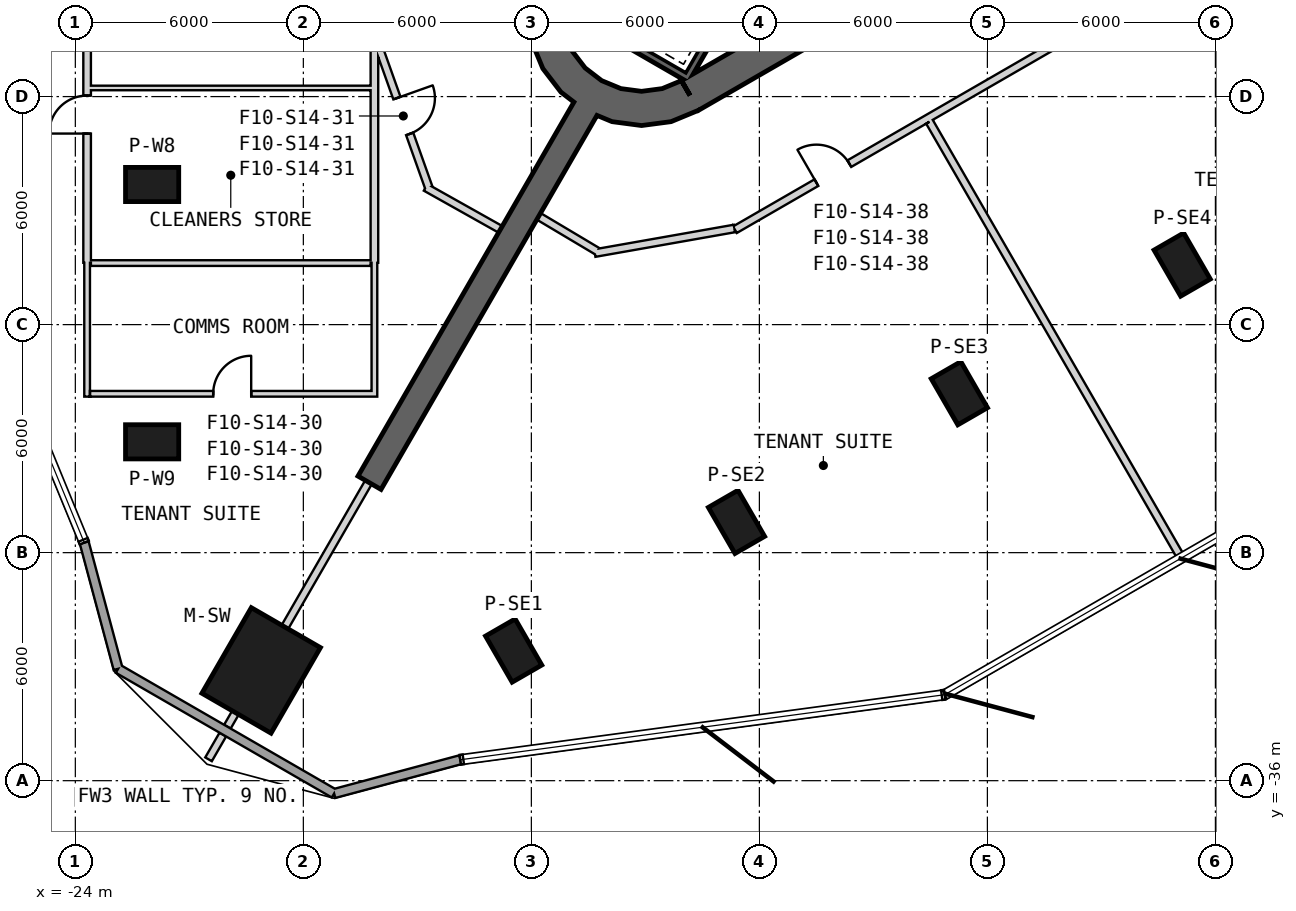
"""IFC4 building model, lengths in metres.
Left out: names, types, materials, properties, quantities, classifications, styles, units other than length and angle.
Written with IfcOpenShell. Run it as: python <this file> out.ifc"""

import sys

from ifc_helpers import new_model, si_unit, direction, frame, frame_2d, origin, origin_2d, place, context, subcontext, project, spatial, polyline, rectangle, outline, extrude, element, fill, save


model = new_model("IFC4")
c1 = context("Model", 3, precision=1e-05, world=origin(), true_north=direction((0.0, 1.0)))
c2 = subcontext(c1, "Body", "Model", "MODEL_VIEW")
j1 = project(units=[si_unit("LENGTHUNIT", "METRE"), si_unit("PLANEANGLEUNIT", "RADIAN")], contexts=[c1])
p1 = place(None, origin())
s1 = spatial("IfcSite", under=j1, at=p1, CompositionType="ELEMENT")
p2 = place(p1, origin())
s2 = spatial("IfcBuilding", under=s1, at=p2, CompositionType="ELEMENT")
p3 = place(p2, frame((0.0, 0.0, 229.2)))
s3 = spatial("IfcBuildingStorey", under=s2, at=p3, CompositionType="ELEMENT", Elevation=229.2)
p4 = place(p3, frame((-19.11, -33.099, 0.0), z_axis=(0.0, 0.0, 1.0), x_axis=(-0.5, -0.866025403784, 0.0)))
e1 = element("IfcColumn", 1, at=p4, inside=s3, PredefinedType="COLUMN", context=c2, shape_type="SweptSolid", body=[
    extrude(rectangle(XDim=2.6, YDim=2.1, at=origin_2d()), origin(), (0.0, 0.0, 1.0), 4.0),
])
for number, where, z_axis, x_axis in (
    (2, (-21.979, -20.313, 0.0), (0.0, 0.0, 1.0), (-1.0, 0.0, 0.0)),
    (3, (-21.979, -27.084, 0.0), (0.0, 0.0, 1.0), (-1.0, 0.0, 0.0)),
    (4, (-12.466, -32.576, 0.0), (0.0, 0.0, 1.0), (0.5, -0.866, 0.0)),
    (5, (-6.602, -29.191, 0.0), (0.0, 0.0, 1.0), (0.5, -0.866, 0.0)),
    (6, (-0.738, -25.805, 0.0), (0.0, 0.0, 1.0), (0.5, -0.866, 0.0)),
    (7, (5.126, -22.42, 0.0), (0.0, 0.0, 1.0), (0.5, -0.866, 0.0)),
):
    element("IfcColumn", number, at=place(p3, frame(where, z_axis=z_axis, x_axis=x_axis)), inside=s3, PredefinedType="COLUMN", context=c2, shape_type="SweptSolid", body=[
        extrude(rectangle(XDim=1.4, YDim=0.9, at=origin_2d()), origin(), (0.0, 0.0, 1.0), 4.0),
    ])
p5 = place(p3, frame((-7.825, -17.97, 0.0), z_axis=(0.0, 0.0, 1.0), x_axis=(0.866028369851, 0.499994862586, 0.0)))
e8 = element("IfcWall", 8, at=p5, inside=s3, PredefinedType="SHEAR", context=c2, shape_type="SweptSolid", body=[
    extrude(rectangle(XDim=31.523, YDim=0.9, at=frame_2d((15.762, 0.0))), origin(), (0.0, 0.0, 1.0), 4.0),
])
p6 = place(p5, frame((7.062, 0.0, 0.0)))
e9 = element("IfcOpeningElement", 9, at=p6, cuts=e8, PredefinedType="OPENING", context=c2, shape_type="SweptSolid", body=[
    extrude(rectangle(XDim=1.2, YDim=2.4, at=frame_2d((0.6, 1.2))), frame((0.0, 0.46, 0.0), z_axis=(0.0, -1.0, 0.0), x_axis=(1.0, 0.0, 0.0)), (0.0, 0.0, 1.0), 0.92),
])
p7 = place(p5, frame((9.762, 0.0, 0.0)))
e10 = element("IfcOpeningElement", 10, at=p7, cuts=e8, PredefinedType="OPENING", context=c2, shape_type="SweptSolid", body=[
    extrude(rectangle(XDim=1.2, YDim=2.4, at=frame_2d((0.6, 1.2))), frame((0.0, 0.46, 0.0), z_axis=(0.0, -1.0, 0.0), x_axis=(1.0, 0.0, 0.0)), (0.0, 0.0, 1.0), 0.92),
])
p8 = place(p5, frame((12.462, 0.0, 0.0)))
e11 = element("IfcOpeningElement", 11, at=p8, cuts=e8, PredefinedType="OPENING", context=c2, shape_type="SweptSolid", body=[
    extrude(rectangle(XDim=1.2, YDim=2.4, at=frame_2d((0.6, 1.2))), frame((0.0, 0.46, 0.0), z_axis=(0.0, -1.0, 0.0), x_axis=(1.0, 0.0, 0.0)), (0.0, 0.0, 1.0), 0.92),
])
p9 = place(p5, frame((15.162, 0.0, 0.0)))
e12 = element("IfcOpeningElement", 12, at=p9, cuts=e8, PredefinedType="OPENING", context=c2, shape_type="SweptSolid", body=[
    extrude(rectangle(XDim=1.2, YDim=2.4, at=frame_2d((0.6, 1.2))), frame((0.0, 0.46, 0.0), z_axis=(0.0, -1.0, 0.0), x_axis=(1.0, 0.0, 0.0)), (0.0, 0.0, 1.0), 0.92),
])
p10 = place(p5, frame((17.862, 0.0, 0.0)))
e13 = element("IfcOpeningElement", 13, at=p10, cuts=e8, PredefinedType="OPENING", context=c2, shape_type="SweptSolid", body=[
    extrude(rectangle(XDim=1.2, YDim=2.4, at=frame_2d((0.6, 1.2))), frame((0.0, 0.46, 0.0), z_axis=(0.0, -1.0, 0.0), x_axis=(1.0, 0.0, 0.0)), (0.0, 0.0, 1.0), 0.92),
])
p11 = place(p5, frame((20.562, 0.0, 0.0)))
e14 = element("IfcOpeningElement", 14, at=p11, cuts=e8, PredefinedType="OPENING", context=c2, shape_type="SweptSolid", body=[
    extrude(rectangle(XDim=1.2, YDim=2.4, at=frame_2d((0.6, 1.2))), frame((0.0, 0.46, 0.0), z_axis=(0.0, -1.0, 0.0), x_axis=(1.0, 0.0, 0.0)), (0.0, 0.0, 1.0), 0.92),
])
p12 = place(p5, frame((26.712, 0.0, 0.0)))
e15 = element("IfcOpeningElement", 15, at=p12, cuts=e8, PredefinedType="OPENING", context=c2, shape_type="SweptSolid", body=[
    extrude(rectangle(XDim=1.2, YDim=2.4, at=frame_2d((0.6, 1.2))), frame((0.0, 0.46, 0.0), z_axis=(0.0, -1.0, 0.0), x_axis=(1.0, 0.0, 0.0)), (0.0, 0.0, 1.0), 0.92),
])
p13 = place(p5, frame((3.612, 0.0, 0.0)))
e16 = element("IfcOpeningElement", 16, at=p13, cuts=e8, PredefinedType="OPENING", context=c2, shape_type="SweptSolid", body=[
    extrude(rectangle(XDim=1.2, YDim=2.4, at=frame_2d((0.6, 1.2))), frame((0.0, 0.46, 0.0), z_axis=(0.0, -1.0, 0.0), x_axis=(1.0, 0.0, 0.0)), (0.0, 0.0, 1.0), 0.92),
])
p14 = place(p3, origin())
e17 = element("IfcWall", 17, at=p14, inside=s3, PredefinedType="SHEAR", context=c2, shape_type="SweptSolid", body=[
    extrude(outline(polyline([(-12.1, -15.762), (-11.998, -16.538), (-11.698, -17.262), (-11.221, -17.883), (-10.6, -18.36), (-9.876, -18.659), (-9.1, -18.762), (-8.323, -18.659), (-7.6, -18.36), (-8.05, -17.58), (-8.556, -17.79), (-9.1, -17.862), (-9.644, -17.79), (-10.15, -17.58), (-10.585, -17.247), (-10.919, -16.812), (-11.128, -16.305), (-11.2, -15.762), (-12.1, -15.762)])), origin(), (0.0, 0.0, 1.0), 4.0),
])
p15 = place(p3, frame((-10.575, -18.316, 0.0), z_axis=(0.0, 0.0, 1.0), x_axis=(-0.499996344484, -0.866027514288, 0.0)))
e18 = element("IfcWall", 18, at=p15, inside=s3, PredefinedType="SHEAR", context=c2, shape_type="SweptSolid", body=[
    extrude(rectangle(XDim=11.368, YDim=0.7, at=frame_2d((5.684, 0.0))), origin(), (0.0, 0.0, 1.0), 4.0),
])
p16 = place(p3, frame((-23.765, -29.736, 0.0), z_axis=(0.0, 0.0, 1.0), x_axis=(0.258842571536, -0.965919522093, 0.0)))
e19 = element("IfcWall", 19, at=p16, inside=s3, PredefinedType="SOLIDWALL", context=c2, shape_type="SweptSolid", body=[
    extrude(rectangle(XDim=3.438, YDim=0.24, at=frame_2d((1.719, 0.0))), origin(), (0.0, 0.0, 1.0), 3.7),
])
p17 = place(p3, frame((-22.875, -33.057, 0.0), z_axis=(0.0, 0.0, 1.0), x_axis=(0.866012172048, -0.50002291734, 0.0)))
e20 = element("IfcWall", 20, at=p17, inside=s3, PredefinedType="SOLIDWALL", context=c2, shape_type="SweptSolid", body=[
    extrude(rectangle(XDim=6.565, YDim=0.24, at=frame_2d((3.282, 0.0))), origin(), (0.0, 0.0, 1.0), 3.7),
])
p18 = place(p3, frame((-17.19, -36.339, 0.0), z_axis=(0.0, 0.0, 1.0), x_axis=(0.965919522093, 0.258842571536, 0.0)))
e21 = element("IfcWall", 21, at=p18, inside=s3, PredefinedType="SOLIDWALL", context=c2, shape_type="SweptSolid", body=[
    extrude(rectangle(XDim=3.438, YDim=0.24, at=frame_2d((1.719, 0.0))), origin(), (0.0, 0.0, 1.0), 3.7),
])
p19 = place(p3, frame((-3.905, -10.563, -0.3), z_axis=(0.0, 0.0, 1.0), x_axis=(-0.500012932018, -0.866017937352, 0.0)))
e22 = element("IfcWall", 22, at=p19, inside=s3, PredefinedType="SHEAR", context=c2, shape_type="SweptSolid", body=[
    extrude(rectangle(XDim=8.1, YDim=0.2, at=frame_2d((4.05, 0.0))), origin(), (0.0, 0.0, 1.0), 4.0),
])
p20 = place(p3, frame((-11.282, -15.541, -0.3), z_axis=(0.0, 0.0, 1.0), x_axis=(0.866000483506, -0.500043160704, 0.0)))
e23 = element("IfcWall", 23, at=p20, inside=s3, PredefinedType="SHEAR", context=c2, shape_type="SweptSolid", body=[
    extrude(rectangle(XDim=3.8, YDim=0.2, at=frame_2d((1.9, 0.0))), origin(), (0.0, 0.0, 1.0), 4.0),
])
p21 = place(p3, frame((-14.781, -20.389, 0.0), z_axis=(0.0, 0.0, 1.0), x_axis=(0.871979734391, -0.489541972471, 0.0)))
e24 = element("IfcWall", 24, at=p21, inside=s3, PredefinedType="PARTITIONING", context=c2, shape_type="SweptSolid", body=[
    extrude(rectangle(XDim=2.257, YDim=0.2, at=frame_2d((1.128, 0.0))), origin(), (0.0, 0.0, 1.0), 3.7),
])
p22 = place(p3, frame((-16.042, -16.623, 0.0), z_axis=(0.0, 0.0, 1.0), x_axis=(0.335572111171, -0.942014521228, 0.0)))
e25 = element("IfcWall", 25, at=p22, inside=s3, PredefinedType="PARTITIONING", context=c2, shape_type="SweptSolid", body=[
    extrude(rectangle(XDim=4.007, YDim=0.2, at=frame_2d((2.004, 0.0))), origin(), (0.0, 0.0, 1.0), 2.78),
])
p23 = place(p22, frame((1.504, 0.0, 0.0)))
e26 = element("IfcOpeningElement", 26, at=p23, cuts=e25, PredefinedType="OPENING", context=c2, shape_type="SweptSolid", body=[
    extrude(rectangle(XDim=1.0, YDim=2.1, at=frame_2d((0.5, 1.05))), frame((0.0, 0.11, 0.0), z_axis=(0.0, -1.0, 0.0), x_axis=(1.0, 0.0, 0.0)), (0.0, 0.0, 1.0), 0.22),
])
p24 = place(p3, frame((-6.644, -21.503, 0.0), z_axis=(0.0, 0.0, 1.0), x_axis=(0.866020815794, 0.500007946548, 0.0)))
e27 = element("IfcWall", 27, at=p24, inside=s3, PredefinedType="PARTITIONING", context=c2, shape_type="SweptSolid", body=[
    extrude(rectangle(XDim=18.555, YDim=0.2, at=frame_2d((9.278, 0.0))), origin(), (0.0, 0.0, 1.0), 2.88),
])
p25 = place(p24, frame((2.477, 0.0, 0.0)))
e28 = element("IfcOpeningElement", 28, at=p25, cuts=e27, PredefinedType="OPENING", context=c2, shape_type="SweptSolid", body=[
    extrude(rectangle(XDim=1.0, YDim=2.1, at=frame_2d((0.5, 1.05))), frame((0.0, 0.11, 0.0), z_axis=(0.0, -1.0, 0.0), x_axis=(1.0, 0.0, 0.0)), (0.0, 0.0, 1.0), 0.22),
])
p26 = place(p3, frame((-10.332, -22.118, 0.0), z_axis=(0.0, 0.0, 1.0), x_axis=(0.984805281118, 0.173662195893, 0.0)))
e29 = element("IfcWall", 29, at=p26, inside=s3, PredefinedType="PARTITIONING", context=c2, shape_type="SweptSolid", body=[
    extrude(rectangle(XDim=3.732, YDim=0.2, at=frame_2d((1.866, 0.0))), origin(), (0.0, 0.0, 1.0), 2.78),
])
p27 = place(p3, frame((-11.807, -21.151, 0.0), z_axis=(0.0, 0.0, 1.0), x_axis=(0.859102811579, -0.511803047214, 0.0)))
e30 = element("IfcWall", 30, at=p27, inside=s3, PredefinedType="PARTITIONING", context=c2, shape_type="SweptSolid", body=[
    extrude(rectangle(XDim=1.802, YDim=0.2, at=frame_2d((0.901, 0.0))), origin(), (0.0, 0.0, 1.0), 3.7),
])
p28 = place(p3, frame((-16.285, -28.146, 0.0), z_axis=(0.0, 0.0, 1.0), x_axis=(-0.499992938033, -0.866029480975, 0.0)))
e31 = element("IfcWall", 31, at=p28, inside=s3, PredefinedType="PARTITIONING", context=c2, shape_type="SweptSolid", body=[
    extrude(rectangle(XDim=4.401, YDim=0.2, at=frame_2d((2.201, 0.0))), origin(), (0.0, 0.0, 1.0), 3.27),
])
p29 = place(p3, frame((-19.786, -34.21, 0.0), z_axis=(0.0, 0.0, 1.0), x_axis=(-0.50001992892, -0.866013897511, 0.0)))
e32 = element("IfcWall", 32, at=p29, inside=s3, PredefinedType="PARTITIONING", context=c2, shape_type="SweptSolid", body=[
    extrude(rectangle(XDim=0.426, YDim=0.2, at=frame_2d((0.213, 0.0))), origin(), (0.0, 0.0, 1.0), 3.7),
])
p30 = place(p3, frame((-20.119, -34.787, 0.0), z_axis=(0.0, 0.0, 1.0), x_axis=(-0.500088105676, -0.865974529972, 0.0)))
e33 = element("IfcWall", 33, at=p30, inside=s3, PredefinedType="PARTITIONING", context=c2, shape_type="SweptSolid", body=[
    extrude(rectangle(XDim=0.751, YDim=0.2, at=frame_2d((0.375, 0.0))), origin(), (0.0, 0.0, 1.0), 3.7),
])
p31 = place(p3, frame((-23.69, -22.373, 0.0), z_axis=(0.0, 0.0, 1.0), x_axis=(0.0, 1.0, 0.0)))
e34 = element("IfcWall", 34, at=p31, inside=s3, PredefinedType="PARTITIONING", context=c2, shape_type="SweptSolid", body=[
    extrude(rectangle(XDim=4.6, YDim=0.2, at=frame_2d((2.3, 0.0))), origin(), (0.0, 0.0, 1.0), 3.7),
])
p32 = place(p31, frame((3.4, 0.0, 0.0)))
e35 = element("IfcOpeningElement", 35, at=p32, cuts=e34, PredefinedType="OPENING", context=c2, shape_type="SweptSolid", body=[
    extrude(rectangle(XDim=1.0, YDim=2.1, at=frame_2d((0.5, 1.05))), frame((0.0, 0.11, 0.0), z_axis=(0.0, -1.0, 0.0), x_axis=(1.0, 0.0, 0.0)), (0.0, 0.0, 1.0), 0.22),
])
p33 = place(p3, frame((-23.69, -17.773, 0.0), z_axis=(0.0, 0.0, 1.0), x_axis=(0.0, 1.0, 0.0)))
e36 = element("IfcWall", 36, at=p33, inside=s3, PredefinedType="PARTITIONING", context=c2, shape_type="SweptSolid", body=[
    extrude(rectangle(XDim=3.422, YDim=0.2, at=frame_2d((1.711, 0.0))), origin(), (0.0, 0.0, 1.0), 3.7),
])
p34 = place(p3, frame((-16.13, -22.373, 0.0), z_axis=(0.0, 0.0, 1.0), x_axis=(0.0, 1.0, 0.0)))
e37 = element("IfcWall", 37, at=p34, inside=s3, PredefinedType="PARTITIONING", context=c2, shape_type="SweptSolid", body=[
    extrude(rectangle(XDim=4.6, YDim=0.2, at=frame_2d((2.3, 0.0))), origin(), (0.0, 0.0, 1.0), 2.78),
])
p35 = place(p3, frame((-16.13, -17.773, 0.0), z_axis=(0.0, 0.0, 1.0), x_axis=(0.0, 1.0, 0.0)))
e38 = element("IfcWall", 38, at=p35, inside=s3, PredefinedType="PARTITIONING", context=c2, shape_type="SweptSolid", body=[
    extrude(rectangle(XDim=1.26, YDim=0.2, at=frame_2d((0.63, 0.0))), origin(), (0.0, 0.0, 1.0), 3.7),
])
p36 = place(p3, frame((-23.69, -25.895, 0.0), z_axis=(0.0, 0.0, 1.0), x_axis=(0.0, 1.0, 0.0)))
e39 = element("IfcWall", 39, at=p36, inside=s3, PredefinedType="PLUMBINGWALL", context=c2, shape_type="SweptSolid", body=[
    extrude(rectangle(XDim=3.522, YDim=0.15, at=frame_2d((1.761, 0.0))), origin(), (0.0, 0.0, 1.0), 3.7),
])
p37 = place(p3, frame((-23.615, -25.82, 0.0), z_axis=(0.0, 0.0, 1.0), x_axis=(1.0, 0.0, 0.0)))
e40 = element("IfcWall", 40, at=p37, inside=s3, PredefinedType="PLUMBINGWALL", context=c2, shape_type="SweptSolid", body=[
    extrude(rectangle(XDim=7.56, YDim=0.15, at=frame_2d((3.78, 0.0))), origin(), (0.0, 0.0, 1.0), 2.78),
])
p38 = place(p37, frame((3.242, 0.0, 0.0)))
e41 = element("IfcOpeningElement", 41, at=p38, cuts=e40, PredefinedType="OPENING", context=c2, shape_type="SweptSolid", body=[
    extrude(rectangle(XDim=1.0, YDim=2.1, at=frame_2d((0.5, 1.05))), frame((0.0, 0.085, 0.0), z_axis=(0.0, -1.0, 0.0), x_axis=(1.0, 0.0, 0.0)), (0.0, 0.0, 1.0), 0.17),
])
p39 = place(p3, frame((-16.13, -25.745, 0.0), z_axis=(0.0, 0.0, 1.0), x_axis=(0.0, 1.0, 0.0)))
e42 = element("IfcWall", 42, at=p39, inside=s3, PredefinedType="PLUMBINGWALL", context=c2, shape_type="SweptSolid", body=[
    extrude(rectangle(XDim=3.372, YDim=0.15, at=frame_2d((1.686, 0.0))), origin(), (0.0, 0.0, 1.0), 3.7),
])
p40 = place(p3, frame((5.104, -30.142, 0.0), z_axis=(0.0, 0.0, 1.0), x_axis=(-0.500068930226, 0.865985603242, 0.0)))
e43 = element("IfcWall", 43, at=p40, inside=s3, PredefinedType="PARTITIONING", context=c2, shape_type="SweptSolid", body=[
    extrude(rectangle(XDim=13.256, YDim=0.2, at=frame_2d((6.628, 0.0))), origin(), (0.0, 0.0, 1.0), 2.98),
])
p41 = place(p3, frame((-16.23, -17.773, 0.0), z_axis=(0.0, 0.0, 1.0), x_axis=(-1.0, 0.0, 0.0)))
e44 = element("IfcWall", 44, at=p41, inside=s3, PredefinedType="PARTITIONING", context=c2, shape_type="SweptSolid", body=[
    extrude(rectangle(XDim=7.36, YDim=0.12, at=frame_2d((3.68, 0.0))), origin(), (0.0, 0.0, 1.0), 2.88),
])
p42 = place(p3, frame((-23.59, -22.38, 0.0), z_axis=(0.0, 0.0, 1.0), x_axis=(1.0, 0.0, 0.0)))
e45 = element("IfcWall", 45, at=p42, inside=s3, PredefinedType="PLUMBINGWALL", context=c2, shape_type="SweptSolid", body=[
    extrude(rectangle(XDim=7.36, YDim=0.15, at=frame_2d((3.68, 0.0))), origin(), (0.0, 0.0, 1.0), 2.78),
])
p43 = place(p32, origin())
e46 = element("IfcDoor", 46, at=p43, inside=s3, OperationType="SINGLE_SWING_RIGHT", PredefinedType="USERDEFINED", context=c2, shape_type="SweptSolid", body=[
    extrude(rectangle(XDim=1.0, YDim=2.1, at=frame_2d((0.5, 1.05))), frame((0.0, 0.025, 0.0), z_axis=(0.0, -1.0, 0.0), x_axis=(1.0, 0.0, 0.0)), (0.0, 0.0, 1.0), 0.05),
])
fill(e35, e46)
p44 = place(p38, origin())
e47 = element("IfcDoor", 47, at=p44, inside=s3, OperationType="SINGLE_SWING_RIGHT", PredefinedType="USERDEFINED", context=c2, shape_type="SweptSolid", body=[
    extrude(rectangle(XDim=1.0, YDim=2.1, at=frame_2d((0.5, 1.05))), frame((0.0, 0.025, 0.0), z_axis=(0.0, -1.0, 0.0), x_axis=(1.0, 0.0, 0.0)), (0.0, 0.0, 1.0), 0.05),
])
fill(e41, e47)
p45 = place(p23, origin())
e48 = element("IfcDoor", 48, at=p45, inside=s3, OperationType="SINGLE_SWING_LEFT", PredefinedType="USERDEFINED", context=c2, shape_type="SweptSolid", body=[
    extrude(rectangle(XDim=1.0, YDim=2.1, at=frame_2d((0.5, 1.05))), frame((0.0, 0.025, 0.0), z_axis=(0.0, -1.0, 0.0), x_axis=(1.0, 0.0, 0.0)), (0.0, 0.0, 1.0), 0.05),
])
fill(e26, e48)
p46 = place(p25, origin())
e49 = element("IfcDoor", 49, at=p46, inside=s3, OperationType="SINGLE_SWING_RIGHT", PredefinedType="USERDEFINED", context=c2, shape_type="SweptSolid", body=[
    extrude(rectangle(XDim=1.0, YDim=2.1, at=frame_2d((0.5, 1.05))), frame((0.0, 0.025, 0.0), z_axis=(0.0, -1.0, 0.0), x_axis=(1.0, 0.0, 0.0)), (0.0, 0.0, 1.0), 0.05),
])
fill(e28, e49)
save(model, sys.argv[1])
